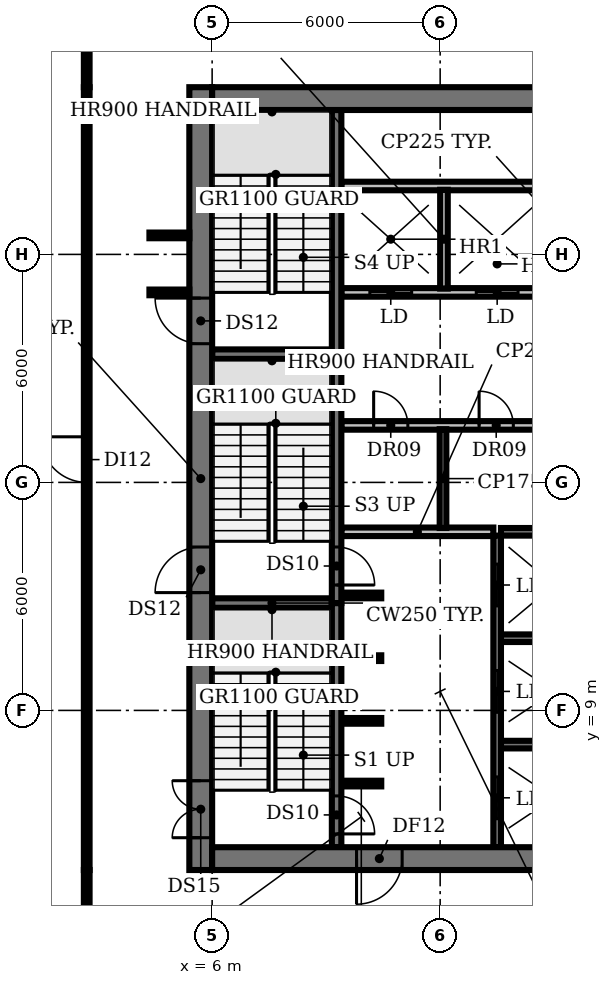
"""IFC4 building model, lengths in metres.
Left out: names, types, materials, properties, quantities, classifications, styles, units other than length and angle.
Written with IfcOpenShell. Run it as: python <this file> out.ifc"""

import sys

from ifc_helpers import new_model, si_unit, direction, frame, frame_2d, origin, place, context, subcontext, project, spatial, rectangle, extrude, element, fill, save


model = new_model("IFC4")
c1 = context("Model", 3, precision=1e-05, world=origin(), true_north=direction((0.0, 1.0)))
c2 = subcontext(c1, "Body", "Model", "MODEL_VIEW")
j1 = project(units=[si_unit("LENGTHUNIT", "METRE"), si_unit("PLANEANGLEUNIT", "RADIAN")], contexts=[c1])
p1 = place(None, origin())
s1 = spatial("IfcSite", under=j1, at=p1, CompositionType="ELEMENT")
p2 = place(p1, origin())
s2 = spatial("IfcBuilding", under=s1, at=p2, CompositionType="ELEMENT")
p3 = place(p2, frame((0.0, 0.0, 155.0)))
s3 = spatial("IfcBuildingStorey", under=s2, at=p3, CompositionType="ELEMENT", Elevation=155.0)
p4 = place(p3, frame((9.4, 7.075, 0.0), z_axis=(0.0, 0.0, 1.0), x_axis=(1.0, 0.0, 0.0)))
e1 = element("IfcWall", 1, at=p4, inside=s3, PredefinedType="SHEAR", context=c2, shape_type="SweptSolid", body=[
    extrude(rectangle(XDim=1.05, YDim=0.15, at=frame_2d((0.525, 0.0))), origin(), (0.0, 0.0, 1.0), 3.85),
])
p5 = place(p3, frame((13.6, 8.1, 0.0), z_axis=(0.0, 0.0, 1.0), x_axis=(1.0, 0.0, 0.0)))
e2 = element("IfcWall", 2, at=p5, inside=s3, PredefinedType="SHEAR", context=c2, shape_type="SweptSolid", body=[
    extrude(rectangle(XDim=2.8, YDim=0.2, at=frame_2d((1.4, 0.0))), origin(), (0.0, 0.0, 1.0), 3.85),
])
for number, where, z_axis, x_axis in (
    (3, (9.4, 8.725, 0.0), (0.0, 0.0, 1.0), (1.0, 0.0, 0.0)),
    (4, (9.4, 10.375, 0.0), (0.0, 0.0, 1.0), (1.0, 0.0, 0.0)),
):
    element("IfcWall", number, at=place(p3, frame(where, z_axis=z_axis, x_axis=x_axis)), inside=s3, PredefinedType="SHEAR", context=c2, shape_type="SweptSolid", body=[
        extrude(rectangle(XDim=1.05, YDim=0.15, at=frame_2d((0.525, 0.0))), origin(), (0.0, 0.0, 1.0), 3.85),
    ])
p6 = place(p3, frame((13.6, 10.9, 0.0), z_axis=(0.0, 0.0, 1.0), x_axis=(1.0, 0.0, 0.0)))
e5 = element("IfcWall", 5, at=p6, inside=s3, PredefinedType="SHEAR", context=c2, shape_type="SweptSolid", body=[
    extrude(rectangle(XDim=2.8, YDim=0.2, at=frame_2d((1.4, 0.0))), origin(), (0.0, 0.0, 1.0), 3.85),
])
p7 = place(p3, frame((6.0, 11.825, 0.0), z_axis=(0.0, 0.0, 1.0), x_axis=(1.0, 0.0, 0.0)))
e6 = element("IfcWall", 6, at=p7, inside=s3, PredefinedType="SHEAR", context=c2, shape_type="SweptSolid", body=[
    extrude(rectangle(XDim=3.15, YDim=0.25, at=frame_2d((1.575, 0.0))), origin(), (0.0, 0.0, 1.0), 3.85),
])
p8 = place(p3, frame((9.4, 12.025, 0.0), z_axis=(0.0, 0.0, 1.0), x_axis=(1.0, 0.0, 0.0)))
e7 = element("IfcWall", 7, at=p8, inside=s3, PredefinedType="SHEAR", context=c2, shape_type="SweptSolid", body=[
    extrude(rectangle(XDim=1.05, YDim=0.15, at=frame_2d((0.525, 0.0))), origin(), (0.0, 0.0, 1.0), 3.85),
])
p9 = place(p3, frame((9.4, 13.7, 0.0), z_axis=(0.0, 0.0, 1.0), x_axis=(1.0, 0.0, 0.0)))
e8 = element("IfcWall", 8, at=p9, inside=s3, PredefinedType="PARTITIONING", context=c2, shape_type="SweptSolid", body=[
    extrude(rectangle(XDim=4.0, YDim=0.225, at=frame_2d((2.0, 0.0))), origin(), (0.0, 0.0, 1.0), 3.85),
])
p10 = place(p3, frame((13.6, 13.7, 0.0), z_axis=(0.0, 0.0, 1.0), x_axis=(1.0, 0.0, 0.0)))
e9 = element("IfcWall", 9, at=p10, inside=s3, PredefinedType="SHEAR", context=c2, shape_type="SweptSolid", body=[
    extrude(rectangle(XDim=2.8, YDim=0.2, at=frame_2d((1.4, 0.0))), origin(), (0.0, 0.0, 1.0), 3.85),
])
p11 = place(p3, frame((9.4, 16.5, 0.0), z_axis=(0.0, 0.0, 1.0), x_axis=(1.0, 0.0, 0.0)))
e10 = element("IfcWall", 10, at=p11, inside=s3, PredefinedType="PARTITIONING", context=c2, shape_type="SweptSolid", body=[
    extrude(rectangle(XDim=14.6, YDim=0.225, at=frame_2d((7.3, 0.0))), origin(), (0.0, 0.0, 1.0), 3.85),
])
p12 = place(p11, frame((0.85, 0.0, 0.0)))
e11 = element("IfcOpeningElement", 11, at=p12, cuts=e10, PredefinedType="OPENING", context=c2, shape_type="SweptSolid", body=[
    extrude(rectangle(XDim=0.9, YDim=2.1, at=frame_2d((0.45, 1.05))), frame((0.0, 0.123, 0.0), z_axis=(0.0, -1.0, 0.0), x_axis=(1.0, 0.0, 0.0)), (0.0, 0.0, 1.0), 0.245),
])
p13 = place(p11, frame((3.625, 0.0, 0.0)))
e12 = element("IfcOpeningElement", 12, at=p13, cuts=e10, PredefinedType="OPENING", context=c2, shape_type="SweptSolid", body=[
    extrude(rectangle(XDim=0.9, YDim=2.1, at=frame_2d((0.45, 1.05))), frame((0.0, 0.123, 0.0), z_axis=(0.0, -1.0, 0.0), x_axis=(1.0, 0.0, 0.0)), (0.0, 0.0, 1.0), 0.245),
])
p14 = place(p11, frame((7.775, 0.0, 0.0)))
e13 = element("IfcOpeningElement", 13, at=p14, cuts=e10, PredefinedType="OPENING", context=c2, shape_type="SweptSolid", body=[
    extrude(rectangle(XDim=1.0, YDim=2.1, at=frame_2d((0.5, 1.05))), frame((0.0, 0.123, 0.0), z_axis=(0.0, -1.0, 0.0), x_axis=(1.0, 0.0, 0.0)), (0.0, 0.0, 1.0), 0.245),
])
p15 = place(p11, frame((12.4, 0.0, 0.0)))
e14 = element("IfcOpeningElement", 14, at=p15, cuts=e10, PredefinedType="OPENING", context=c2, shape_type="SweptSolid", body=[
    extrude(rectangle(XDim=1.0, YDim=2.1, at=frame_2d((0.5, 1.05))), frame((0.0, 0.123, 0.0), z_axis=(0.0, -1.0, 0.0), x_axis=(1.0, 0.0, 0.0)), (0.0, 0.0, 1.0), 0.245),
])
p16 = place(p3, frame((6.0, 18.375, 0.0), z_axis=(0.0, 0.0, 1.0), x_axis=(1.0, 0.0, 0.0)))
e15 = element("IfcWall", 15, at=p16, inside=s3, PredefinedType="SHEAR", context=c2, shape_type="SweptSolid", body=[
    extrude(rectangle(XDim=3.15, YDim=0.25, at=frame_2d((1.575, 0.0))), origin(), (0.0, 0.0, 1.0), 3.85),
])
p17 = place(p3, frame((24.0, 20.0, 0.0), z_axis=(0.0, 0.0, 1.0), x_axis=(-1.0, 0.0, 0.0)))
e16 = element("IfcWall", 16, at=p17, inside=s3, PredefinedType="PARTITIONING", context=c2, shape_type="SweptSolid", body=[
    extrude(rectangle(XDim=14.6, YDim=0.225, at=frame_2d((7.3, 0.0))), origin(), (0.0, 0.0, 1.0), 3.85),
])
p18 = place(p17, frame((12.75, 0.0, 0.0)))
e17 = element("IfcOpeningElement", 17, at=p18, cuts=e16, PredefinedType="OPENING", context=c2, shape_type="SweptSolid", body=[
    extrude(rectangle(XDim=1.1, YDim=2.1, at=frame_2d((0.55, 1.05))), frame((0.0, 0.123, 0.0), z_axis=(0.0, -1.0, 0.0), x_axis=(1.0, 0.0, 0.0)), (0.0, 0.0, 1.0), 0.245),
])
p19 = place(p17, frame((9.95, 0.0, 0.0)))
e18 = element("IfcOpeningElement", 18, at=p19, cuts=e16, PredefinedType="OPENING", context=c2, shape_type="SweptSolid", body=[
    extrude(rectangle(XDim=1.1, YDim=2.1, at=frame_2d((0.55, 1.05))), frame((0.0, 0.123, 0.0), z_axis=(0.0, -1.0, 0.0), x_axis=(1.0, 0.0, 0.0)), (0.0, 0.0, 1.0), 0.245),
])
p20 = place(p17, frame((7.15, 0.0, 0.0)))
e19 = element("IfcOpeningElement", 19, at=p20, cuts=e16, PredefinedType="OPENING", context=c2, shape_type="SweptSolid", body=[
    extrude(rectangle(XDim=1.1, YDim=2.1, at=frame_2d((0.55, 1.05))), frame((0.0, 0.123, 0.0), z_axis=(0.0, -1.0, 0.0), x_axis=(1.0, 0.0, 0.0)), (0.0, 0.0, 1.0), 0.245),
])
p21 = place(p17, frame((4.35, 0.0, 0.0)))
e20 = element("IfcOpeningElement", 20, at=p21, cuts=e16, PredefinedType="OPENING", context=c2, shape_type="SweptSolid", body=[
    extrude(rectangle(XDim=1.1, YDim=2.1, at=frame_2d((0.55, 1.05))), frame((0.0, 0.123, 0.0), z_axis=(0.0, -1.0, 0.0), x_axis=(1.0, 0.0, 0.0)), (0.0, 0.0, 1.0), 0.245),
])
p22 = place(p17, frame((1.2, 0.0, 0.0)))
e21 = element("IfcOpeningElement", 21, at=p22, cuts=e16, PredefinedType="OPENING", context=c2, shape_type="SweptSolid", body=[
    extrude(rectangle(XDim=1.0, YDim=2.1, at=frame_2d((0.5, 1.05))), frame((0.0, 0.123, 0.0), z_axis=(0.0, -1.0, 0.0), x_axis=(1.0, 0.0, 0.0)), (0.0, 0.0, 1.0), 0.245),
])
p23 = place(p3, frame((9.4, 22.8, 0.0), z_axis=(0.0, 0.0, 1.0), x_axis=(1.0, 0.0, 0.0)))
e22 = element("IfcWall", 22, at=p23, inside=s3, PredefinedType="PARTITIONING", context=c2, shape_type="SweptSolid", body=[
    extrude(rectangle(XDim=14.6, YDim=0.225, at=frame_2d((7.3, 0.0))), origin(), (0.0, 0.0, 1.0), 3.85),
])
p24 = place(p3, frame((9.275, 11.825, 0.0), z_axis=(0.0, 0.0, 1.0), x_axis=(0.0, -1.0, 0.0)))
e23 = element("IfcWall", 23, at=p24, inside=s3, PredefinedType="SHEAR", context=c2, shape_type="SweptSolid", body=[
    extrude(rectangle(XDim=6.425, YDim=0.25, at=frame_2d((3.212, 0.0))), origin(), (0.0, 0.0, 1.0), 3.85),
])
p25 = place(p24, frame((5.075, 0.0, 0.0)))
e24 = element("IfcOpeningElement", 24, at=p25, cuts=e23, PredefinedType="OPENING", context=c2, shape_type="SweptSolid", body=[
    extrude(rectangle(XDim=1.0, YDim=2.1, at=frame_2d((0.5, 1.05))), frame((0.0, 0.135, 0.0), z_axis=(0.0, -1.0, 0.0), x_axis=(1.0, 0.0, 0.0)), (0.0, 0.0, 1.0), 0.27),
])
p26 = place(p3, frame((9.275, 18.375, 0.0), z_axis=(0.0, 0.0, 1.0), x_axis=(0.0, -1.0, 0.0)))
e25 = element("IfcWall", 25, at=p26, inside=s3, PredefinedType="SHEAR", context=c2, shape_type="SweptSolid", body=[
    extrude(rectangle(XDim=6.55, YDim=0.25, at=frame_2d((3.275, 0.0))), origin(), (0.0, 0.0, 1.0), 3.85),
])
p27 = place(p26, frame((5.075, 0.0, 0.0)))
e26 = element("IfcOpeningElement", 26, at=p27, cuts=e25, PredefinedType="OPENING", context=c2, shape_type="SweptSolid", body=[
    extrude(rectangle(XDim=1.0, YDim=2.1, at=frame_2d((0.5, 1.05))), frame((0.0, 0.135, 0.0), z_axis=(0.0, -1.0, 0.0), x_axis=(1.0, 0.0, 0.0)), (0.0, 0.0, 1.0), 0.27),
])
p28 = place(p3, frame((9.275, 18.375, 0.0), z_axis=(0.0, 0.0, 1.0), x_axis=(0.0, 1.0, 0.0)))
e27 = element("IfcWall", 27, at=p28, inside=s3, PredefinedType="SHEAR", context=c2, shape_type="SweptSolid", body=[
    extrude(rectangle(XDim=6.425, YDim=0.25, at=frame_2d((3.212, 0.0))), origin(), (0.0, 0.0, 1.0), 3.85),
])
p29 = place(p3, frame((12.075, 13.8, 0.0), z_axis=(0.0, 0.0, 1.0), x_axis=(0.0, 1.0, 0.0)))
e28 = element("IfcWall", 28, at=p29, inside=s3, PredefinedType="PARTITIONING", context=c2, shape_type="SweptSolid", body=[
    extrude(rectangle(XDim=2.6, YDim=0.175, at=frame_2d((1.3, 0.0))), origin(), (0.0, 0.0, 1.0), 3.85),
])
p30 = place(p3, frame((12.1, 20.1, 0.0), z_axis=(0.0, 0.0, 1.0), x_axis=(0.0, 1.0, 0.0)))
e29 = element("IfcWall", 29, at=p30, inside=s3, PredefinedType="SOLIDWALL", context=c2, shape_type="SweptSolid", body=[
    extrude(rectangle(XDim=2.6, YDim=0.2, at=frame_2d((1.3, 0.0))), origin(), (0.0, 0.0, 1.0), 3.85),
])
p31 = place(p3, frame((13.5, 5.4, 0.0), z_axis=(0.0, 0.0, 1.0), x_axis=(0.0, 1.0, 0.0)))
e30 = element("IfcWall", 30, at=p31, inside=s3, PredefinedType="SHEAR", context=c2, shape_type="SweptSolid", body=[
    extrude(rectangle(XDim=8.2, YDim=0.2, at=frame_2d((4.1, 0.0))), origin(), (0.0, 0.0, 1.0), 3.85),
])
p32 = place(p31, frame((0.75, 0.0, 0.0)))
e31 = element("IfcOpeningElement", 31, at=p32, cuts=e30, PredefinedType="OPENING", context=c2, shape_type="SweptSolid", body=[
    extrude(rectangle(XDim=1.1, YDim=2.1, at=frame_2d((0.55, 1.05))), frame((0.0, 0.11, 0.0), z_axis=(0.0, -1.0, 0.0), x_axis=(1.0, 0.0, 0.0)), (0.0, 0.0, 1.0), 0.22),
])
p33 = place(p31, frame((3.55, 0.0, 0.0)))
e32 = element("IfcOpeningElement", 32, at=p33, cuts=e30, PredefinedType="OPENING", context=c2, shape_type="SweptSolid", body=[
    extrude(rectangle(XDim=1.1, YDim=2.1, at=frame_2d((0.55, 1.05))), frame((0.0, 0.11, 0.0), z_axis=(0.0, -1.0, 0.0), x_axis=(1.0, 0.0, 0.0)), (0.0, 0.0, 1.0), 0.22),
])
p34 = place(p31, frame((6.35, 0.0, 0.0)))
e33 = element("IfcOpeningElement", 33, at=p34, cuts=e30, PredefinedType="OPENING", context=c2, shape_type="SweptSolid", body=[
    extrude(rectangle(XDim=1.1, YDim=2.1, at=frame_2d((0.55, 1.05))), frame((0.0, 0.11, 0.0), z_axis=(0.0, -1.0, 0.0), x_axis=(1.0, 0.0, 0.0)), (0.0, 0.0, 1.0), 0.22),
])
p35 = place(p3, frame((5.7, 4.8, 0.0), z_axis=(0.0, 0.0, 1.0), x_axis=(0.0, 1.0, 0.0)))
e34 = element("IfcWall", 34, at=p35, inside=s3, PredefinedType="SHEAR", context=c2, shape_type="SweptSolid", body=[
    extrude(rectangle(XDim=20.6, YDim=0.6, at=frame_2d((10.3, 0.0))), origin(), (0.0, 0.0, 1.0), 3.85),
])
p36 = place(p35, frame((0.85, 0.0, 0.0)))
e35 = element("IfcOpeningElement", 35, at=p36, cuts=e34, PredefinedType="OPENING", context=c2, shape_type="SweptSolid", body=[
    extrude(rectangle(XDim=1.5, YDim=2.1, at=frame_2d((0.75, 1.05))), frame((0.0, 0.31, 0.0), z_axis=(0.0, -1.0, 0.0), x_axis=(1.0, 0.0, 0.0)), (0.0, 0.0, 1.0), 0.62),
])
p37 = place(p35, frame((7.3, 0.0, 0.0)))
e36 = element("IfcOpeningElement", 36, at=p37, cuts=e34, PredefinedType="OPENING", context=c2, shape_type="SweptSolid", body=[
    extrude(rectangle(XDim=1.2, YDim=2.1, at=frame_2d((0.6, 1.05))), frame((0.0, 0.31, 0.0), z_axis=(0.0, -1.0, 0.0), x_axis=(1.0, 0.0, 0.0)), (0.0, 0.0, 1.0), 0.62),
])
p38 = place(p35, frame((13.85, 0.0, 0.0)))
e37 = element("IfcOpeningElement", 37, at=p38, cuts=e34, PredefinedType="OPENING", context=c2, shape_type="SweptSolid", body=[
    extrude(rectangle(XDim=1.2, YDim=2.1, at=frame_2d((0.6, 1.05))), frame((0.0, 0.31, 0.0), z_axis=(0.0, -1.0, 0.0), x_axis=(1.0, 0.0, 0.0)), (0.0, 0.0, 1.0), 0.62),
])
p39 = place(p3, frame((24.0, 5.1, 0.0), z_axis=(0.0, 0.0, 1.0), x_axis=(-1.0, 0.0, 0.0)))
e38 = element("IfcWall", 38, at=p39, inside=s3, PredefinedType="SHEAR", context=c2, shape_type="SweptSolid", body=[
    extrude(rectangle(XDim=18.0, YDim=0.6, at=frame_2d((9.0, 0.0))), origin(), (0.0, 0.0, 1.0), 3.85),
])
p40 = place(p39, frame((13.0, 0.0, 0.0)))
e39 = element("IfcOpeningElement", 39, at=p40, cuts=e38, PredefinedType="OPENING", context=c2, shape_type="SweptSolid", body=[
    extrude(rectangle(XDim=1.2, YDim=2.1, at=frame_2d((0.6, 1.05))), frame((0.0, 0.31, 0.0), z_axis=(0.0, -1.0, 0.0), x_axis=(1.0, 0.0, 0.0)), (0.0, 0.0, 1.0), 0.62),
])
p41 = place(p39, frame((4.9, 0.0, 0.0)))
e40 = element("IfcOpeningElement", 40, at=p41, cuts=e38, PredefinedType="OPENING", context=c2, shape_type="SweptSolid", body=[
    extrude(rectangle(XDim=1.0, YDim=2.1, at=frame_2d((0.5, 1.05))), frame((0.0, 0.31, 0.0), z_axis=(0.0, -1.0, 0.0), x_axis=(1.0, 0.0, 0.0)), (0.0, 0.0, 1.0), 0.62),
])
p42 = place(p3, frame((6.0, 25.1, 0.0), z_axis=(0.0, 0.0, 1.0), x_axis=(1.0, 0.0, 0.0)))
e41 = element("IfcWall", 41, at=p42, inside=s3, PredefinedType="SHEAR", context=c2, shape_type="SweptSolid", body=[
    extrude(rectangle(XDim=18.0, YDim=0.6, at=frame_2d((9.0, 0.0))), origin(), (0.0, 0.0, 1.0), 3.85),
])
p43 = place(p3, frame((2.7, 0.9, 0.0), z_axis=(0.0, 0.0, 1.0), x_axis=(0.0, 1.0, 0.0)))
e42 = element("IfcWall", 42, at=p43, inside=s3, PredefinedType="PARTITIONING", context=c2, shape_type="SweptSolid", body=[
    extrude(rectangle(XDim=3.9, YDim=0.15, at=frame_2d((1.95, 0.0))), origin(), (0.0, 0.0, 1.0), 2.88),
])
p44 = place(p3, frame((2.7, 4.8, 0.0), z_axis=(0.0, 0.0, 1.0), x_axis=(0.0, 1.0, 0.0)))
e43 = element("IfcWall", 43, at=p44, inside=s3, PredefinedType="PARTITIONING", context=c2, shape_type="SweptSolid", body=[
    extrude(rectangle(XDim=20.6, YDim=0.15, at=frame_2d((10.3, 0.0))), origin(), (0.0, 0.0, 1.0), 2.88),
])
p45 = place(p44, frame((10.2, 0.0, 0.0)))
e44 = element("IfcOpeningElement", 44, at=p45, cuts=e43, PredefinedType="OPENING", context=c2, shape_type="SweptSolid", body=[
    extrude(rectangle(XDim=1.2, YDim=2.1, at=frame_2d((0.6, 1.05))), frame((0.0, 0.085, 0.0), z_axis=(0.0, -1.0, 0.0), x_axis=(1.0, 0.0, 0.0)), (0.0, 0.0, 1.0), 0.17),
])
p46 = place(p3, frame((2.7, 25.4, 0.0), z_axis=(0.0, 0.0, 1.0), x_axis=(0.0, 1.0, 0.0)))
e45 = element("IfcWall", 45, at=p46, inside=s3, PredefinedType="PARTITIONING", context=c2, shape_type="SweptSolid", body=[
    extrude(rectangle(XDim=3.9, YDim=0.15, at=frame_2d((1.95, 0.0))), origin(), (0.0, 0.0, 1.0), 2.88),
])
for number, where, z_axis, x_axis in (
    (46, (4.35, 20.0, 0.0), (0.0, 0.0, 1.0), (1.0, 0.0, 0.0)),
    (47, (4.35, 21.5, 0.0), (0.0, 0.0, 1.0), (1.0, 0.0, 0.0)),
):
    element("IfcWall", number, at=place(p3, frame(where, z_axis=z_axis, x_axis=x_axis)), inside=s3, PredefinedType="PARTITIONING", context=c2, shape_type="SweptSolid", body=[
        extrude(rectangle(XDim=1.05, YDim=0.15, at=frame_2d((0.525, 0.0))), origin(), (0.0, 0.0, 1.0), 2.88),
    ])
p47 = place(p12, origin())
e48 = element("IfcDoor", 48, at=p47, inside=s3, OperationType="SINGLE_SWING_LEFT", PredefinedType="DOOR", context=c2, shape_type="SweptSolid", body=[
    extrude(rectangle(XDim=0.9, YDim=2.1, at=frame_2d((0.45, 1.05))), frame((0.0, 0.025, 0.0), z_axis=(0.0, -1.0, 0.0), x_axis=(1.0, 0.0, 0.0)), (0.0, 0.0, 1.0), 0.05),
])
fill(e11, e48)
p48 = place(p13, origin())
e49 = element("IfcDoor", 49, at=p48, inside=s3, OperationType="SINGLE_SWING_LEFT", PredefinedType="DOOR", context=c2, shape_type="SweptSolid", body=[
    extrude(rectangle(XDim=0.9, YDim=2.1, at=frame_2d((0.45, 1.05))), frame((0.0, 0.025, 0.0), z_axis=(0.0, -1.0, 0.0), x_axis=(1.0, 0.0, 0.0)), (0.0, 0.0, 1.0), 0.05),
])
fill(e12, e49)
p49 = place(p18, origin())
e50 = element("IfcDoor", 50, at=p49, inside=s3, OperationType="DOUBLE_DOOR_SLIDING", PredefinedType="DOOR", context=c2, shape_type="SweptSolid", body=[
    extrude(rectangle(XDim=1.1, YDim=2.1, at=frame_2d((0.55, 1.05))), frame((0.0, 0.025, 0.0), z_axis=(0.0, -1.0, 0.0), x_axis=(1.0, 0.0, 0.0)), (0.0, 0.0, 1.0), 0.05),
])
fill(e17, e50)
p50 = place(p19, origin())
e51 = element("IfcDoor", 51, at=p50, inside=s3, OperationType="DOUBLE_DOOR_SLIDING", PredefinedType="DOOR", context=c2, shape_type="SweptSolid", body=[
    extrude(rectangle(XDim=1.1, YDim=2.1, at=frame_2d((0.55, 1.05))), frame((0.0, 0.025, 0.0), z_axis=(0.0, -1.0, 0.0), x_axis=(1.0, 0.0, 0.0)), (0.0, 0.0, 1.0), 0.05),
])
fill(e18, e51)
p51 = place(p25, origin())
e52 = element("IfcDoor", 52, at=p51, inside=s3, OperationType="SINGLE_SWING_RIGHT", PredefinedType="DOOR", context=c2, shape_type="SweptSolid", body=[
    extrude(rectangle(XDim=1.0, YDim=2.1, at=frame_2d((0.5, 1.05))), frame((0.0, 0.025, 0.0), z_axis=(0.0, -1.0, 0.0), x_axis=(1.0, 0.0, 0.0)), (0.0, 0.0, 1.0), 0.05),
])
fill(e24, e52)
p52 = place(p27, origin())
e53 = element("IfcDoor", 53, at=p52, inside=s3, OperationType="SINGLE_SWING_RIGHT", PredefinedType="DOOR", context=c2, shape_type="SweptSolid", body=[
    extrude(rectangle(XDim=1.0, YDim=2.1, at=frame_2d((0.5, 1.05))), frame((0.0, 0.025, 0.0), z_axis=(0.0, -1.0, 0.0), x_axis=(1.0, 0.0, 0.0)), (0.0, 0.0, 1.0), 0.05),
])
fill(e26, e53)
p53 = place(p32, origin())
e54 = element("IfcDoor", 54, at=p53, inside=s3, OperationType="DOUBLE_DOOR_SLIDING", PredefinedType="DOOR", context=c2, shape_type="SweptSolid", body=[
    extrude(rectangle(XDim=1.1, YDim=2.1, at=frame_2d((0.55, 1.05))), frame((0.0, 0.025, 0.0), z_axis=(0.0, -1.0, 0.0), x_axis=(1.0, 0.0, 0.0)), (0.0, 0.0, 1.0), 0.05),
])
fill(e31, e54)
p54 = place(p33, origin())
e55 = element("IfcDoor", 55, at=p54, inside=s3, OperationType="DOUBLE_DOOR_SLIDING", PredefinedType="DOOR", context=c2, shape_type="SweptSolid", body=[
    extrude(rectangle(XDim=1.1, YDim=2.1, at=frame_2d((0.55, 1.05))), frame((0.0, 0.025, 0.0), z_axis=(0.0, -1.0, 0.0), x_axis=(1.0, 0.0, 0.0)), (0.0, 0.0, 1.0), 0.05),
])
fill(e32, e55)
p55 = place(p34, origin())
e56 = element("IfcDoor", 56, at=p55, inside=s3, OperationType="DOUBLE_DOOR_SLIDING", PredefinedType="DOOR", context=c2, shape_type="SweptSolid", body=[
    extrude(rectangle(XDim=1.1, YDim=2.1, at=frame_2d((0.55, 1.05))), frame((0.0, 0.025, 0.0), z_axis=(0.0, -1.0, 0.0), x_axis=(1.0, 0.0, 0.0)), (0.0, 0.0, 1.0), 0.05),
])
fill(e33, e56)
p56 = place(p36, origin())
e57 = element("IfcDoor", 57, at=p56, inside=s3, OperationType="DOUBLE_DOOR_SINGLE_SWING", PredefinedType="DOOR", context=c2, shape_type="SweptSolid", body=[
    extrude(rectangle(XDim=1.5, YDim=2.1, at=frame_2d((0.75, 1.05))), frame((0.0, 0.025, 0.0), z_axis=(0.0, -1.0, 0.0), x_axis=(1.0, 0.0, 0.0)), (0.0, 0.0, 1.0), 0.05),
])
fill(e35, e57)
p57 = place(p37, origin())
e58 = element("IfcDoor", 58, at=p57, inside=s3, OperationType="SINGLE_SWING_LEFT", PredefinedType="DOOR", context=c2, shape_type="SweptSolid", body=[
    extrude(rectangle(XDim=1.2, YDim=2.1, at=frame_2d((0.6, 1.05))), frame((0.0, 0.025, 0.0), z_axis=(0.0, -1.0, 0.0), x_axis=(1.0, 0.0, 0.0)), (0.0, 0.0, 1.0), 0.05),
])
fill(e36, e58)
p58 = place(p38, origin())
e59 = element("IfcDoor", 59, at=p58, inside=s3, OperationType="SINGLE_SWING_RIGHT", PredefinedType="DOOR", context=c2, shape_type="SweptSolid", body=[
    extrude(rectangle(XDim=1.2, YDim=2.1, at=frame_2d((0.6, 1.05))), frame((0.0, 0.025, 0.0), z_axis=(0.0, -1.0, 0.0), x_axis=(1.0, 0.0, 0.0)), (0.0, 0.0, 1.0), 0.05),
])
fill(e37, e59)
p59 = place(p40, origin())
e60 = element("IfcDoor", 60, at=p59, inside=s3, OperationType="SINGLE_SWING_RIGHT", PredefinedType="DOOR", context=c2, shape_type="SweptSolid", body=[
    extrude(rectangle(XDim=1.2, YDim=2.1, at=frame_2d((0.6, 1.05))), frame((0.0, 0.025, 0.0), z_axis=(0.0, -1.0, 0.0), x_axis=(1.0, 0.0, 0.0)), (0.0, 0.0, 1.0), 0.05),
])
fill(e39, e60)
p60 = place(p45, origin())
e61 = element("IfcDoor", 61, at=p60, inside=s3, OperationType="SINGLE_SWING_RIGHT", PredefinedType="DOOR", context=c2, shape_type="SweptSolid", body=[
    extrude(rectangle(XDim=1.2, YDim=2.1, at=frame_2d((0.6, 1.05))), frame((0.0, 0.025, 0.0), z_axis=(0.0, -1.0, 0.0), x_axis=(1.0, 0.0, 0.0)), (0.0, 0.0, 1.0), 0.05),
])
fill(e44, e61)
save(model, sys.argv[1])
